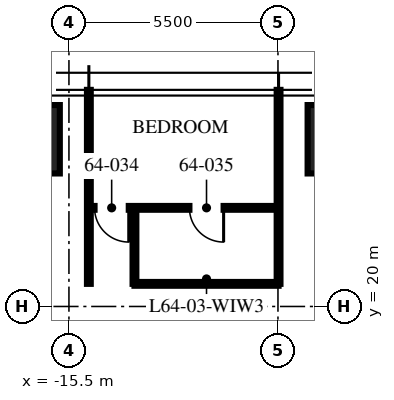
"""IFC4 building model, lengths in metres.
Left out: names, types, materials, properties, quantities, classifications, styles, units other than length and angle.
Written with IfcOpenShell. Run it as: python <this file> out.ifc"""

import sys

from ifc_helpers import new_model, si_unit, direction, frame, frame_2d, origin, origin_2d, place, context, subcontext, project, spatial, rectangle, extrude, element, fill, save


model = new_model("IFC4")
c1 = context("Model", 3, precision=1e-05, world=origin(), true_north=direction((0.0, 1.0)))
c2 = subcontext(c1, "Body", "Model", "MODEL_VIEW")
j1 = project(units=[si_unit("LENGTHUNIT", "METRE"), si_unit("PLANEANGLEUNIT", "RADIAN")], contexts=[c1])
p1 = place(None, origin())
s1 = spatial("IfcSite", under=j1, at=p1, CompositionType="ELEMENT")
p2 = place(p1, origin())
s2 = spatial("IfcBuilding", under=s1, at=p2, CompositionType="ELEMENT")
p3 = place(p2, frame((0.0, 0.0, 255.75)))
s3 = spatial("IfcBuildingStorey", under=s2, at=p3, CompositionType="ELEMENT", Elevation=255.75)
for number, where, z_axis, x_axis in (
    (1, (-16.64, 24.4, 0.0), (0.0, 0.0, 1.0), (1.0, 0.0, 0.0)),
    (2, (-8.32, 24.4, 0.0), (0.0, 0.0, 1.0), (1.0, 0.0, 0.0)),
):
    element("IfcColumn", number, at=place(p3, frame(where, z_axis=z_axis, x_axis=x_axis)), inside=s3, PredefinedType="COLUMN", context=c2, shape_type="SweptSolid", body=[
        extrude(rectangle(XDim=1.8, YDim=1.8, at=origin_2d()), origin(), (0.0, 0.0, 1.0), 3.75),
    ])
for number, where, z_axis, x_axis in (
    (3, (-9.984, 20.595, 0.0), (0.0, 0.0, 1.0), (0.0, 1.0, 0.0)),
    (4, (-14.976, 20.595, 0.0), (0.0, 0.0, 1.0), (0.0, 1.0, 0.0)),
):
    element("IfcWall", number, at=place(p3, frame(where, z_axis=z_axis, x_axis=x_axis)), inside=s3, PredefinedType="PARTITIONING", context=c2, shape_type="SweptSolid", body=[
        extrude(rectangle(XDim=5.105, YDim=0.1, at=frame_2d((2.552, 0.0))), origin(), (0.0, 0.0, 1.0), 2.91),
    ])
p4 = place(p3, frame((-9.984, 22.595, 0.0), z_axis=(0.0, 0.0, 1.0), x_axis=(-1.0, 0.0, 0.0)))
e5 = element("IfcWall", 5, at=p4, inside=s3, PredefinedType="PARTITIONING", context=c2, shape_type="SweptSolid", body=[
    extrude(rectangle(XDim=4.992, YDim=0.1, at=frame_2d((2.496, 0.0))), origin(), (0.0, 0.0, 1.0), 2.81),
])
p5 = place(p4, frame((3.942, 0.0, 0.0)))
e6 = element("IfcOpeningElement", 6, at=p5, cuts=e5, PredefinedType="OPENING", context=c2, shape_type="SweptSolid", body=[
    extrude(rectangle(XDim=0.9, YDim=2.1, at=frame_2d((0.45, 1.05))), frame((0.0, 0.06, 0.0), z_axis=(0.0, -1.0, 0.0), x_axis=(1.0, 0.0, 0.0)), (0.0, 0.0, 1.0), 0.12),
])
p6 = place(p4, frame((1.446, 0.0, 0.0)))
e7 = element("IfcOpeningElement", 7, at=p6, cuts=e5, PredefinedType="OPENING", context=c2, shape_type="SweptSolid", body=[
    extrude(rectangle(XDim=0.9, YDim=2.1, at=frame_2d((0.45, 1.05))), frame((0.0, 0.06, 0.0), z_axis=(0.0, -1.0, 0.0), x_axis=(1.0, 0.0, 0.0)), (0.0, 0.0, 1.0), 0.12),
])
p7 = place(p3, frame((-13.776, 20.595, 0.0), z_axis=(0.0, 0.0, 1.0), x_axis=(0.0, 1.0, 0.0)))
e8 = element("IfcWall", 8, at=p7, inside=s3, PredefinedType="PARTITIONING", context=c2, shape_type="SweptSolid", body=[
    extrude(rectangle(XDim=2.0, YDim=0.1, at=frame_2d((1.0, 0.0))), origin(), (0.0, 0.0, 1.0), 3.5),
])
p8 = place(p3, frame((-9.984, 20.595, 0.0), z_axis=(0.0, 0.0, 1.0), x_axis=(-1.0, 0.0, 0.0)))
e9 = element("IfcWall", 9, at=p8, inside=s3, PredefinedType="PARTITIONING", context=c2, shape_type="SweptSolid", body=[
    extrude(rectangle(XDim=3.792, YDim=0.1, at=frame_2d((1.896, 0.0))), origin(), (0.0, 0.0, 1.0), 2.81),
])
p9 = place(p5, origin())
e10 = element("IfcDoor", 10, at=p9, inside=s3, OperationType="SINGLE_SWING_LEFT", PredefinedType="DOOR", context=c2, shape_type="SweptSolid", body=[
    extrude(rectangle(XDim=0.9, YDim=2.1, at=frame_2d((0.45, 1.05))), frame((0.0, 0.025, 0.0), z_axis=(0.0, -1.0, 0.0), x_axis=(1.0, 0.0, 0.0)), (0.0, 0.0, 1.0), 0.05),
])
fill(e6, e10)
p10 = place(p6, origin())
e11 = element("IfcDoor", 11, at=p10, inside=s3, OperationType="SINGLE_SWING_LEFT", PredefinedType="DOOR", context=c2, shape_type="SweptSolid", body=[
    extrude(rectangle(XDim=0.9, YDim=2.1, at=frame_2d((0.45, 1.05))), frame((0.0, 0.025, 0.0), z_axis=(0.0, -1.0, 0.0), x_axis=(1.0, 0.0, 0.0)), (0.0, 0.0, 1.0), 0.05),
])
fill(e7, e11)
save(model, sys.argv[1])
